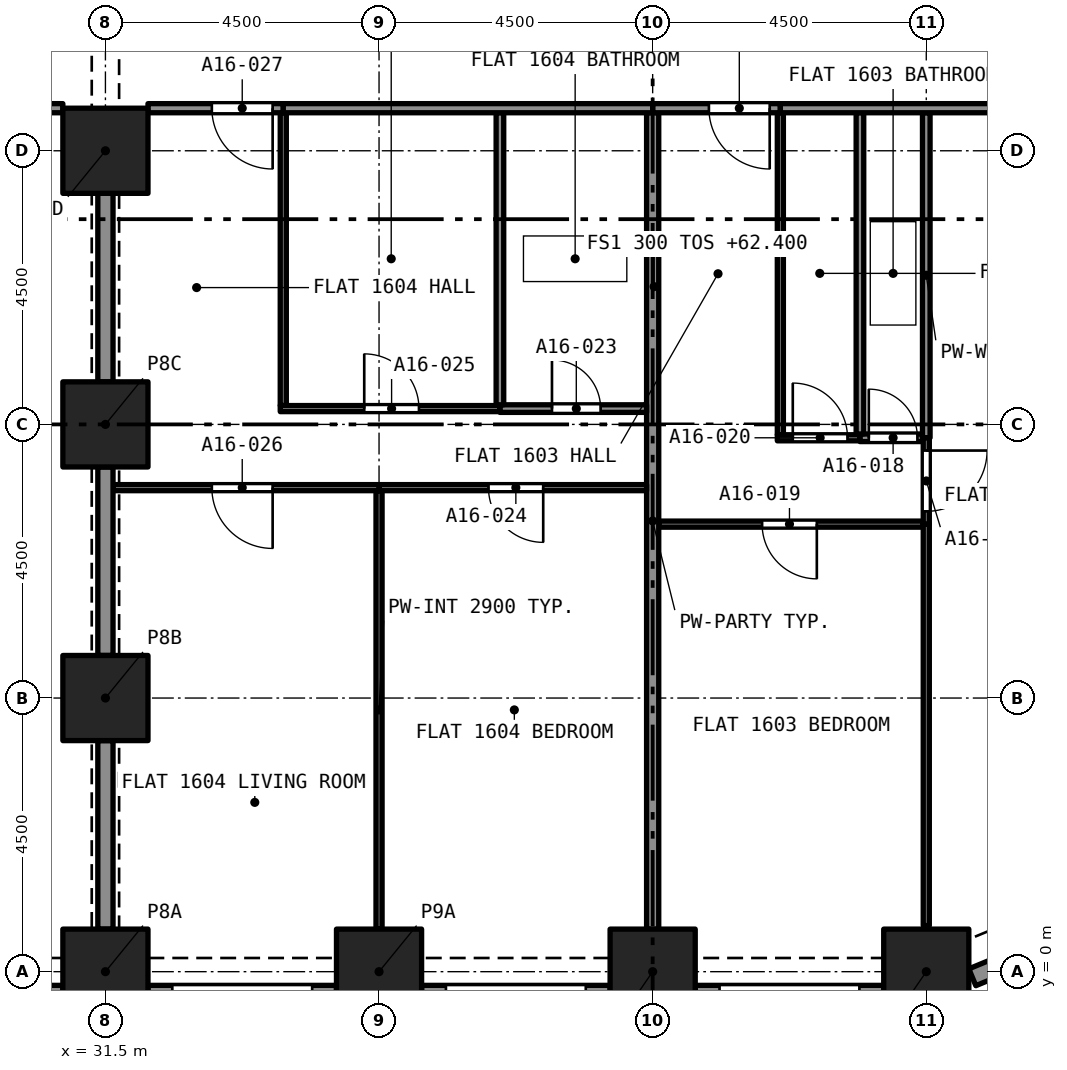
"""IFC4 building model, lengths in metres.
Left out: names, types, materials, properties, quantities, classifications, styles, units other than length and angle.
Written with IfcOpenShell. Run it as: python <this file> out.ifc"""

import sys

from ifc_helpers import new_model, si_unit, direction, frame, frame_2d, origin, origin_2d, place, context, subcontext, project, spatial, rectangle, extrude, element, fill, save


model = new_model("IFC4")
c1 = context("Model", 3, precision=1e-05, world=origin(), true_north=direction((0.0, 1.0)))
c2 = subcontext(c1, "Body", "Model", "MODEL_VIEW")
j1 = project(units=[si_unit("LENGTHUNIT", "METRE"), si_unit("PLANEANGLEUNIT", "RADIAN")], contexts=[c1])
p1 = place(None, origin())
s1 = spatial("IfcSite", under=j1, at=p1, CompositionType="ELEMENT")
p2 = place(p1, origin())
s2 = spatial("IfcBuilding", under=s1, at=p2, CompositionType="ELEMENT")
p3 = place(p2, frame((0.0, 0.0, 62.4)))
s3 = spatial("IfcBuildingStorey", under=s2, at=p3, CompositionType="ELEMENT", Elevation=62.4)
for number, where, z_axis, x_axis in (
    (1, (31.5, 0.0, 0.0), (0.0, 0.0, 1.0), (1.0, 0.0, 0.0)),
    (2, (36.0, 0.0, 0.0), (0.0, 0.0, 1.0), (1.0, 0.0, 0.0)),
    (3, (40.5, 0.0, 0.0), (0.0, 0.0, 1.0), (1.0, 0.0, 0.0)),
    (4, (45.0, 0.0, 0.0), (0.0, 0.0, 1.0), (1.0, 0.0, 0.0)),
    (5, (31.5, 4.5, 0.0), (0.0, 0.0, 1.0), (1.0, 0.0, 0.0)),
    (6, (31.5, 9.0, 0.0), (0.0, 0.0, 1.0), (1.0, 0.0, 0.0)),
    (7, (31.5, 13.5, 0.0), (0.0, 0.0, 1.0), (1.0, 0.0, 0.0)),
):
    element("IfcColumn", number, at=place(p3, frame(where, z_axis=z_axis, x_axis=x_axis)), inside=s3, PredefinedType="COLUMN", context=c2, shape_type="SweptSolid", body=[
        extrude(rectangle(XDim=1.4, YDim=1.4, at=origin_2d()), origin(), (0.0, 0.0, 1.0), 3.2),
    ])
p4 = place(p3, frame((30.8, -0.375, 0.0), z_axis=(0.0, 0.0, 1.0), x_axis=(-1.0, 0.0, 0.0)))
e8 = element("IfcWall", 8, at=p4, inside=s3, PredefinedType="SOLIDWALL", context=c2, shape_type="SweptSolid", body=[
    extrude(rectangle(XDim=3.1, YDim=0.3, at=frame_2d((1.55, 0.0))), origin(), (0.0, 0.0, 1.0), 3.2),
])
p5 = place(p4, frame((0.4, 0.0, 0.45)))
e9 = element("IfcOpeningElement", 9, at=p5, cuts=e8, PredefinedType="OPENING", context=c2, shape_type="SweptSolid", body=[
    extrude(rectangle(XDim=2.3, YDim=1.95, at=frame_2d((1.15, 0.975))), frame((0.0, 0.16, 0.0), z_axis=(0.0, -1.0, 0.0), x_axis=(1.0, 0.0, 0.0)), (0.0, 0.0, 1.0), 0.32),
])
p6 = place(p3, frame((35.3, -0.375, 0.0), z_axis=(0.0, 0.0, 1.0), x_axis=(-1.0, 0.0, 0.0)))
e10 = element("IfcWall", 10, at=p6, inside=s3, PredefinedType="SOLIDWALL", context=c2, shape_type="SweptSolid", body=[
    extrude(rectangle(XDim=3.1, YDim=0.3, at=frame_2d((1.55, 0.0))), origin(), (0.0, 0.0, 1.0), 3.2),
])
p7 = place(p6, frame((0.4, 0.0, 0.45)))
e11 = element("IfcOpeningElement", 11, at=p7, cuts=e10, PredefinedType="OPENING", context=c2, shape_type="SweptSolid", body=[
    extrude(rectangle(XDim=2.3, YDim=1.95, at=frame_2d((1.15, 0.975))), frame((0.0, 0.16, 0.0), z_axis=(0.0, -1.0, 0.0), x_axis=(1.0, 0.0, 0.0)), (0.0, 0.0, 1.0), 0.32),
])
p8 = place(p3, frame((39.8, -0.375, 0.0), z_axis=(0.0, 0.0, 1.0), x_axis=(-1.0, 0.0, 0.0)))
e12 = element("IfcWall", 12, at=p8, inside=s3, PredefinedType="SOLIDWALL", context=c2, shape_type="SweptSolid", body=[
    extrude(rectangle(XDim=3.1, YDim=0.3, at=frame_2d((1.55, 0.0))), origin(), (0.0, 0.0, 1.0), 3.2),
])
p9 = place(p8, frame((0.4, 0.0, 0.45)))
e13 = element("IfcOpeningElement", 13, at=p9, cuts=e12, PredefinedType="OPENING", context=c2, shape_type="SweptSolid", body=[
    extrude(rectangle(XDim=2.3, YDim=1.95, at=frame_2d((1.15, 0.975))), frame((0.0, 0.16, 0.0), z_axis=(0.0, -1.0, 0.0), x_axis=(1.0, 0.0, 0.0)), (0.0, 0.0, 1.0), 0.32),
])
p10 = place(p3, frame((44.3, -0.375, 0.0), z_axis=(0.0, 0.0, 1.0), x_axis=(-1.0, 0.0, 0.0)))
e14 = element("IfcWall", 14, at=p10, inside=s3, PredefinedType="SOLIDWALL", context=c2, shape_type="SweptSolid", body=[
    extrude(rectangle(XDim=3.1, YDim=0.3, at=frame_2d((1.55, 0.0))), origin(), (0.0, 0.0, 1.0), 3.2),
])
p11 = place(p10, frame((0.4, 0.0, 0.45)))
e15 = element("IfcOpeningElement", 15, at=p11, cuts=e14, PredefinedType="OPENING", context=c2, shape_type="SweptSolid", body=[
    extrude(rectangle(XDim=2.3, YDim=1.95, at=frame_2d((1.15, 0.975))), frame((0.0, 0.16, 0.0), z_axis=(0.0, -1.0, 0.0), x_axis=(1.0, 0.0, 0.0)), (0.0, 0.0, 1.0), 0.32),
])
p12 = place(p3, frame((47.48, 0.622, 0.0), z_axis=(0.0, 0.0, 1.0), x_axis=(-0.923903565336, -0.38262540684, 0.0)))
e16 = element("IfcWall", 16, at=p12, inside=s3, PredefinedType="SOLIDWALL", context=c2, shape_type="SweptSolid", body=[
    extrude(rectangle(XDim=1.865, YDim=0.3, at=frame_2d((0.933, 0.0))), origin(), (0.0, 0.0, 1.0), 3.2),
])
p13 = place(p12, frame((0.258, 0.0, 0.45)))
e17 = element("IfcOpeningElement", 17, at=p13, cuts=e16, PredefinedType="OPENING", context=c2, shape_type="SweptSolid", body=[
    extrude(rectangle(XDim=1.1, YDim=1.95, at=frame_2d((0.55, 0.975))), frame((0.0, 0.16, 0.0), z_axis=(0.0, -1.0, 0.0), x_axis=(1.0, 0.0, 0.0)), (0.0, 0.0, 1.0), 0.32),
])
p14 = place(p3, frame((43.909, 8.78, 0.0), z_axis=(0.0, 0.0, 1.0), x_axis=(1.0, 0.0, 0.0)))
e18 = element("IfcWall", 18, at=p14, inside=s3, PredefinedType="PARTITIONING", context=c2, shape_type="SweptSolid", body=[
    extrude(rectangle(XDim=1.028, YDim=0.125, at=frame_2d((0.514, 0.0))), origin(), (0.0, 0.0, 1.0), 2.9),
])
p15 = place(p14, frame((0.146, 0.0, 0.0)))
e19 = element("IfcOpeningElement", 19, at=p15, cuts=e18, PredefinedType="OPENING", context=c2, shape_type="SweptSolid", body=[
    extrude(rectangle(XDim=0.8, YDim=2.1, at=frame_2d((0.4, 1.05))), frame((0.0, 0.073, 0.0), z_axis=(0.0, -1.0, 0.0), x_axis=(1.0, 0.0, 0.0)), (0.0, 0.0, 1.0), 0.145),
])
p16 = place(p3, frame((43.909, 8.843, 0.0), z_axis=(0.0, 0.0, 1.0), x_axis=(0.0, 1.0, 0.0)))
e20 = element("IfcWall", 20, at=p16, inside=s3, PredefinedType="PARTITIONING", context=c2, shape_type="SweptSolid", body=[
    extrude(rectangle(XDim=5.282, YDim=0.125, at=frame_2d((2.641, 0.0))), origin(), (0.0, 0.0, 1.0), 2.9),
])
p17 = place(p3, frame((45.0, 8.78, 0.0), z_axis=(0.0, 0.0, 1.0), x_axis=(0.0, 1.0, 0.0)))
e21 = element("IfcWall", 21, at=p17, inside=s3, PredefinedType="PARTITIONING", context=c2, shape_type="SweptSolid", body=[
    extrude(rectangle(XDim=5.345, YDim=0.125, at=frame_2d((2.672, 0.0))), origin(), (0.0, 0.0, 1.0), 2.9),
])
p18 = place(p3, frame((44.95, 7.36, 0.0), z_axis=(0.0, 0.0, 1.0), x_axis=(-1.0, 0.0, 0.0)))
e22 = element("IfcWall", 22, at=p18, inside=s3, PredefinedType="PARTITIONING", context=c2, shape_type="SweptSolid", body=[
    extrude(rectangle(XDim=4.35, YDim=0.1, at=frame_2d((2.175, 0.0))), origin(), (0.0, 0.0, 1.0), 2.9),
])
p19 = place(p18, frame((1.75, 0.0, 0.0)))
e23 = element("IfcOpeningElement", 23, at=p19, cuts=e22, PredefinedType="OPENING", context=c2, shape_type="SweptSolid", body=[
    extrude(rectangle(XDim=0.9, YDim=2.1, at=frame_2d((0.45, 1.05))), frame((0.0, 0.06, 0.0), z_axis=(0.0, -1.0, 0.0), x_axis=(1.0, 0.0, 0.0)), (0.0, 0.0, 1.0), 0.12),
])
p20 = place(p3, frame((45.0, 0.758, 0.0), z_axis=(0.0, 0.0, 1.0), x_axis=(0.0, 1.0, 0.0)))
e24 = element("IfcWall", 24, at=p20, inside=s3, PredefinedType="PARTITIONING", context=c2, shape_type="SweptSolid", body=[
    extrude(rectangle(XDim=6.603, YDim=0.1, at=frame_2d((3.301, 0.0))), origin(), (0.0, 0.0, 1.0), 2.9),
])
p21 = place(p3, frame((40.5, 0.7, 0.0), z_axis=(0.0, 0.0, 1.0), x_axis=(0.0, 1.0, 0.0)))
e25 = element("IfcWall", 25, at=p21, inside=s3, PredefinedType="PARTITIONING", context=c2, shape_type="SweptSolid", body=[
    extrude(rectangle(XDim=13.425, YDim=0.2, at=frame_2d((6.712, 0.0))), origin(), (0.0, 0.0, 1.0), 2.9),
])
p22 = place(p3, frame((42.6, 8.83, 0.0), z_axis=(0.0, 0.0, 1.0), x_axis=(0.0, 1.0, 0.0)))
e26 = element("IfcWall", 26, at=p22, inside=s3, PredefinedType="PARTITIONING", context=c2, shape_type="SweptSolid", body=[
    extrude(rectangle(XDim=5.295, YDim=0.1, at=frame_2d((2.647, 0.0))), origin(), (0.0, 0.0, 1.0), 2.9),
])
p23 = place(p3, frame((42.55, 8.78, 0.0), z_axis=(0.0, 0.0, 1.0), x_axis=(1.0, 0.0, 0.0)))
e27 = element("IfcWall", 27, at=p23, inside=s3, PredefinedType="PARTITIONING", context=c2, shape_type="SweptSolid", body=[
    extrude(rectangle(XDim=1.359, YDim=0.1, at=frame_2d((0.68, 0.0))), origin(), (0.0, 0.0, 1.0), 2.9),
])
p24 = place(p23, frame((0.254, 0.0, 0.0)))
e28 = element("IfcOpeningElement", 28, at=p24, cuts=e27, PredefinedType="OPENING", context=c2, shape_type="SweptSolid", body=[
    extrude(rectangle(XDim=0.9, YDim=2.1, at=frame_2d((0.45, 1.05))), frame((0.0, 0.06, 0.0), z_axis=(0.0, -1.0, 0.0), x_axis=(1.0, 0.0, 0.0)), (0.0, 0.0, 1.0), 0.12),
])
p25 = place(p3, frame((45.0, 8.78, 0.0), z_axis=(0.0, 0.0, 1.0), x_axis=(0.0, -1.0, 0.0)))
e29 = element("IfcWall", 29, at=p25, inside=s3, PredefinedType="PARTITIONING", context=c2, shape_type="SweptSolid", body=[
    extrude(rectangle(XDim=1.42, YDim=0.1, at=frame_2d((0.71, 0.0))), origin(), (0.0, 0.0, 1.0), 2.9),
])
p26 = place(p25, frame((0.21, 0.0, 0.0)))
e30 = element("IfcOpeningElement", 30, at=p26, cuts=e29, PredefinedType="OPENING", context=c2, shape_type="SweptSolid", body=[
    extrude(rectangle(XDim=1.0, YDim=2.1, at=frame_2d((0.5, 1.05))), frame((0.0, 0.06, 0.0), z_axis=(0.0, -1.0, 0.0), x_axis=(1.0, 0.0, 0.0)), (0.0, 0.0, 1.0), 0.12),
])
p27 = place(p3, frame((42.6, 14.2, 0.0), z_axis=(0.0, 0.0, 1.0), x_axis=(-1.0, 0.0, 0.0)))
e31 = element("IfcWall", 31, at=p27, inside=s3, PredefinedType="PARTITIONING", context=c2, shape_type="SweptSolid", body=[
    extrude(rectangle(XDim=2.1, YDim=0.15, at=frame_2d((1.05, 0.0))), origin(), (0.0, 0.0, 1.0), 2.9),
])
p28 = place(p27, frame((0.175, 0.0, 0.0)))
e32 = element("IfcOpeningElement", 32, at=p28, cuts=e31, PredefinedType="OPENING", context=c2, shape_type="SweptSolid", body=[
    extrude(rectangle(XDim=1.0, YDim=2.1, at=frame_2d((0.5, 1.05))), frame((0.0, 0.085, 0.0), z_axis=(0.0, -1.0, 0.0), x_axis=(1.0, 0.0, 0.0)), (0.0, 0.0, 1.0), 0.17),
])
p29 = place(p3, frame((42.6, 14.2, 0.0), z_axis=(0.0, 0.0, 1.0), x_axis=(1.0, 0.0, 0.0)))
e33 = element("IfcWall", 33, at=p29, inside=s3, PredefinedType="PARTITIONING", context=c2, shape_type="SweptSolid", body=[
    extrude(rectangle(XDim=6.2, YDim=0.15, at=frame_2d((3.1, 0.0))), origin(), (0.0, 0.0, 1.0), 2.9),
])
p30 = place(p3, frame((37.988, 9.26, 0.0), z_axis=(0.0, 0.0, 1.0), x_axis=(1.0, 0.0, 0.0)))
e34 = element("IfcWall", 34, at=p30, inside=s3, PredefinedType="PARTITIONING", context=c2, shape_type="SweptSolid", body=[
    extrude(rectangle(XDim=2.412, YDim=0.125, at=frame_2d((1.206, 0.0))), origin(), (0.0, 0.0, 1.0), 2.9),
])
p31 = place(p30, frame((0.856, 0.0, 0.0)))
e35 = element("IfcOpeningElement", 35, at=p31, cuts=e34, PredefinedType="OPENING", context=c2, shape_type="SweptSolid", body=[
    extrude(rectangle(XDim=0.8, YDim=2.1, at=frame_2d((0.4, 1.05))), frame((0.0, 0.073, 0.0), z_axis=(0.0, -1.0, 0.0), x_axis=(1.0, 0.0, 0.0)), (0.0, 0.0, 1.0), 0.145),
])
p32 = place(p3, frame((37.988, 9.323, 0.0), z_axis=(0.0, 0.0, 1.0), x_axis=(0.0, 1.0, 0.0)))
e36 = element("IfcWall", 36, at=p32, inside=s3, PredefinedType="PARTITIONING", context=c2, shape_type="SweptSolid", body=[
    extrude(rectangle(XDim=4.802, YDim=0.125, at=frame_2d((2.401, 0.0))), origin(), (0.0, 0.0, 1.0), 2.9),
])
p33 = place(p3, frame((40.4, 7.96, 0.0), z_axis=(0.0, 0.0, 1.0), x_axis=(-1.0, 0.0, 0.0)))
e37 = element("IfcWall", 37, at=p33, inside=s3, PredefinedType="PARTITIONING", context=c2, shape_type="SweptSolid", body=[
    extrude(rectangle(XDim=4.4, YDim=0.1, at=frame_2d((2.2, 0.0))), origin(), (0.0, 0.0, 1.0), 2.9),
])
p34 = place(p33, frame((1.7, 0.0, 0.0)))
e38 = element("IfcOpeningElement", 38, at=p34, cuts=e37, PredefinedType="OPENING", context=c2, shape_type="SweptSolid", body=[
    extrude(rectangle(XDim=0.9, YDim=2.1, at=frame_2d((0.45, 1.05))), frame((0.0, 0.06, 0.0), z_axis=(0.0, -1.0, 0.0), x_axis=(1.0, 0.0, 0.0)), (0.0, 0.0, 1.0), 0.12),
])
p35 = place(p3, frame((36.0, 0.7, 0.0), z_axis=(0.0, 0.0, 1.0), x_axis=(0.0, 1.0, 0.0)))
e39 = element("IfcWall", 39, at=p35, inside=s3, PredefinedType="PARTITIONING", context=c2, shape_type="SweptSolid", body=[
    extrude(rectangle(XDim=7.21, YDim=0.1, at=frame_2d((3.605, 0.0))), origin(), (0.0, 0.0, 1.0), 2.9),
])
p36 = place(p3, frame((34.425, 9.31, 0.0), z_axis=(0.0, 0.0, 1.0), x_axis=(0.0, 1.0, 0.0)))
e40 = element("IfcWall", 40, at=p36, inside=s3, PredefinedType="PARTITIONING", context=c2, shape_type="SweptSolid", body=[
    extrude(rectangle(XDim=4.815, YDim=0.1, at=frame_2d((2.407, 0.0))), origin(), (0.0, 0.0, 1.0), 2.9),
])
p37 = place(p3, frame((34.375, 9.26, 0.0), z_axis=(0.0, 0.0, 1.0), x_axis=(1.0, 0.0, 0.0)))
e41 = element("IfcWall", 41, at=p37, inside=s3, PredefinedType="PARTITIONING", context=c2, shape_type="SweptSolid", body=[
    extrude(rectangle(XDim=3.613, YDim=0.1, at=frame_2d((1.807, 0.0))), origin(), (0.0, 0.0, 1.0), 2.9),
])
p38 = place(p37, frame((1.382, 0.0, 0.0)))
e42 = element("IfcOpeningElement", 42, at=p38, cuts=e41, PredefinedType="OPENING", context=c2, shape_type="SweptSolid", body=[
    extrude(rectangle(XDim=0.9, YDim=2.1, at=frame_2d((0.45, 1.05))), frame((0.0, 0.06, 0.0), z_axis=(0.0, -1.0, 0.0), x_axis=(1.0, 0.0, 0.0)), (0.0, 0.0, 1.0), 0.12),
])
p39 = place(p3, frame((36.0, 7.96, 0.0), z_axis=(0.0, 0.0, 1.0), x_axis=(-1.0, 0.0, 0.0)))
e43 = element("IfcWall", 43, at=p39, inside=s3, PredefinedType="PARTITIONING", context=c2, shape_type="SweptSolid", body=[
    extrude(rectangle(XDim=4.375, YDim=0.1, at=frame_2d((2.188, 0.0))), origin(), (0.0, 0.0, 1.0), 2.9),
])
p40 = place(p39, frame((1.75, 0.0, 0.0)))
e44 = element("IfcOpeningElement", 44, at=p40, cuts=e43, PredefinedType="OPENING", context=c2, shape_type="SweptSolid", body=[
    extrude(rectangle(XDim=1.0, YDim=2.1, at=frame_2d((0.5, 1.05))), frame((0.0, 0.06, 0.0), z_axis=(0.0, -1.0, 0.0), x_axis=(1.0, 0.0, 0.0)), (0.0, 0.0, 1.0), 0.12),
])
p41 = place(p3, frame((31.5, 9.7, 0.0), z_axis=(0.0, 0.0, 1.0), x_axis=(0.0, 1.0, 0.0)))
e45 = element("IfcWall", 45, at=p41, inside=s3, PredefinedType="PARTITIONING", context=c2, shape_type="SweptSolid", body=[
    extrude(rectangle(XDim=3.1, YDim=0.25, at=frame_2d((1.55, 0.0))), origin(), (0.0, 0.0, 1.0), 2.38),
])
p42 = place(p3, frame((34.425, 14.2, 0.0), z_axis=(0.0, 0.0, 1.0), x_axis=(-1.0, 0.0, 0.0)))
e46 = element("IfcWall", 46, at=p42, inside=s3, PredefinedType="PARTITIONING", context=c2, shape_type="SweptSolid", body=[
    extrude(rectangle(XDim=2.225, YDim=0.15, at=frame_2d((1.113, 0.0))), origin(), (0.0, 0.0, 1.0), 2.9),
])
p43 = place(p42, frame((0.175, 0.0, 0.0)))
e47 = element("IfcOpeningElement", 47, at=p43, cuts=e46, PredefinedType="OPENING", context=c2, shape_type="SweptSolid", body=[
    extrude(rectangle(XDim=1.0, YDim=2.1, at=frame_2d((0.5, 1.05))), frame((0.0, 0.085, 0.0), z_axis=(0.0, -1.0, 0.0), x_axis=(1.0, 0.0, 0.0)), (0.0, 0.0, 1.0), 0.17),
])
p44 = place(p3, frame((34.425, 14.2, 0.0), z_axis=(0.0, 0.0, 1.0), x_axis=(1.0, 0.0, 0.0)))
e48 = element("IfcWall", 48, at=p44, inside=s3, PredefinedType="PARTITIONING", context=c2, shape_type="SweptSolid", body=[
    extrude(rectangle(XDim=6.075, YDim=0.15, at=frame_2d((3.038, 0.0))), origin(), (0.0, 0.0, 1.0), 2.9),
])
for number, where, z_axis, x_axis in (
    (49, (31.5, 0.7, 0.0), (0.0, 0.0, 1.0), (0.0, 1.0, 0.0)),
    (50, (31.5, 5.2, 0.0), (0.0, 0.0, 1.0), (0.0, 1.0, 0.0)),
):
    element("IfcWall", number, at=place(p3, frame(where, z_axis=z_axis, x_axis=x_axis)), inside=s3, PredefinedType="PARTITIONING", context=c2, shape_type="SweptSolid", body=[
        extrude(rectangle(XDim=3.1, YDim=0.25, at=frame_2d((1.55, 0.0))), origin(), (0.0, 0.0, 1.0), 2.38),
    ])
p45 = place(p3, frame((30.8, 14.2, 0.0), z_axis=(0.0, 0.0, 1.0), x_axis=(-1.0, 0.0, 0.0)))
e51 = element("IfcWall", 51, at=p45, inside=s3, PredefinedType="PARTITIONING", context=c2, shape_type="SweptSolid", body=[
    extrude(rectangle(XDim=8.3, YDim=0.15, at=frame_2d((4.15, 0.0))), origin(), (0.0, 0.0, 1.0), 2.75),
])
p46 = place(p45, frame((3.3, 0.0, 0.0)))
e52 = element("IfcOpeningElement", 52, at=p46, cuts=e51, PredefinedType="OPENING", context=c2, shape_type="SweptSolid", body=[
    extrude(rectangle(XDim=1.0, YDim=2.1, at=frame_2d((0.5, 1.05))), frame((0.0, 0.085, 0.0), z_axis=(0.0, -1.0, 0.0), x_axis=(1.0, 0.0, 0.0)), (0.0, 0.0, 1.0), 0.17),
])
p47 = place(p15, origin())
e53 = element("IfcDoor", 53, at=p47, inside=s3, OperationType="SINGLE_SWING_RIGHT", PredefinedType="DOOR", context=c2, shape_type="SweptSolid", body=[
    extrude(rectangle(XDim=0.8, YDim=2.1, at=frame_2d((0.4, 1.05))), frame((0.0, 0.025, 0.0), z_axis=(0.0, -1.0, 0.0), x_axis=(1.0, 0.0, 0.0)), (0.0, 0.0, 1.0), 0.05),
])
fill(e19, e53)
p48 = place(p19, origin())
e54 = element("IfcDoor", 54, at=p48, inside=s3, OperationType="SINGLE_SWING_RIGHT", PredefinedType="DOOR", context=c2, shape_type="SweptSolid", body=[
    extrude(rectangle(XDim=0.9, YDim=2.1, at=frame_2d((0.45, 1.05))), frame((0.0, 0.025, 0.0), z_axis=(0.0, -1.0, 0.0), x_axis=(1.0, 0.0, 0.0)), (0.0, 0.0, 1.0), 0.05),
])
fill(e23, e54)
p49 = place(p24, origin())
e55 = element("IfcDoor", 55, at=p49, inside=s3, OperationType="SINGLE_SWING_RIGHT", PredefinedType="DOOR", context=c2, shape_type="SweptSolid", body=[
    extrude(rectangle(XDim=0.9, YDim=2.1, at=frame_2d((0.45, 1.05))), frame((0.0, 0.025, 0.0), z_axis=(0.0, -1.0, 0.0), x_axis=(1.0, 0.0, 0.0)), (0.0, 0.0, 1.0), 0.05),
])
fill(e28, e55)
p50 = place(p26, origin())
e56 = element("IfcDoor", 56, at=p50, inside=s3, OperationType="SINGLE_SWING_LEFT", PredefinedType="DOOR", context=c2, shape_type="SweptSolid", body=[
    extrude(rectangle(XDim=1.0, YDim=2.1, at=frame_2d((0.5, 1.05))), frame((0.0, 0.025, 0.0), z_axis=(0.0, -1.0, 0.0), x_axis=(1.0, 0.0, 0.0)), (0.0, 0.0, 1.0), 0.05),
])
fill(e30, e56)
p51 = place(p28, origin())
e57 = element("IfcDoor", 57, at=p51, inside=s3, OperationType="SINGLE_SWING_LEFT", PredefinedType="DOOR", context=c2, shape_type="SweptSolid", body=[
    extrude(rectangle(XDim=1.0, YDim=2.1, at=frame_2d((0.5, 1.05))), frame((0.0, 0.025, 0.0), z_axis=(0.0, -1.0, 0.0), x_axis=(1.0, 0.0, 0.0)), (0.0, 0.0, 1.0), 0.05),
])
fill(e32, e57)
p52 = place(p31, origin())
e58 = element("IfcDoor", 58, at=p52, inside=s3, OperationType="SINGLE_SWING_RIGHT", PredefinedType="DOOR", context=c2, shape_type="SweptSolid", body=[
    extrude(rectangle(XDim=0.8, YDim=2.1, at=frame_2d((0.4, 1.05))), frame((0.0, 0.025, 0.0), z_axis=(0.0, -1.0, 0.0), x_axis=(1.0, 0.0, 0.0)), (0.0, 0.0, 1.0), 0.05),
])
fill(e35, e58)
p53 = place(p34, origin())
e59 = element("IfcDoor", 59, at=p53, inside=s3, OperationType="SINGLE_SWING_LEFT", PredefinedType="DOOR", context=c2, shape_type="SweptSolid", body=[
    extrude(rectangle(XDim=0.9, YDim=2.1, at=frame_2d((0.45, 1.05))), frame((0.0, 0.025, 0.0), z_axis=(0.0, -1.0, 0.0), x_axis=(1.0, 0.0, 0.0)), (0.0, 0.0, 1.0), 0.05),
])
fill(e38, e59)
p54 = place(p38, origin())
e60 = element("IfcDoor", 60, at=p54, inside=s3, OperationType="SINGLE_SWING_RIGHT", PredefinedType="DOOR", context=c2, shape_type="SweptSolid", body=[
    extrude(rectangle(XDim=0.9, YDim=2.1, at=frame_2d((0.45, 1.05))), frame((0.0, 0.025, 0.0), z_axis=(0.0, -1.0, 0.0), x_axis=(1.0, 0.0, 0.0)), (0.0, 0.0, 1.0), 0.05),
])
fill(e42, e60)
p55 = place(p40, origin())
e61 = element("IfcDoor", 61, at=p55, inside=s3, OperationType="SINGLE_SWING_RIGHT", PredefinedType="DOOR", context=c2, shape_type="SweptSolid", body=[
    extrude(rectangle(XDim=1.0, YDim=2.1, at=frame_2d((0.5, 1.05))), frame((0.0, 0.025, 0.0), z_axis=(0.0, -1.0, 0.0), x_axis=(1.0, 0.0, 0.0)), (0.0, 0.0, 1.0), 0.05),
])
fill(e44, e61)
p56 = place(p43, origin())
e62 = element("IfcDoor", 62, at=p56, inside=s3, OperationType="SINGLE_SWING_LEFT", PredefinedType="DOOR", context=c2, shape_type="SweptSolid", body=[
    extrude(rectangle(XDim=1.0, YDim=2.1, at=frame_2d((0.5, 1.05))), frame((0.0, 0.025, 0.0), z_axis=(0.0, -1.0, 0.0), x_axis=(1.0, 0.0, 0.0)), (0.0, 0.0, 1.0), 0.05),
])
fill(e47, e62)
save(model, sys.argv[1])
